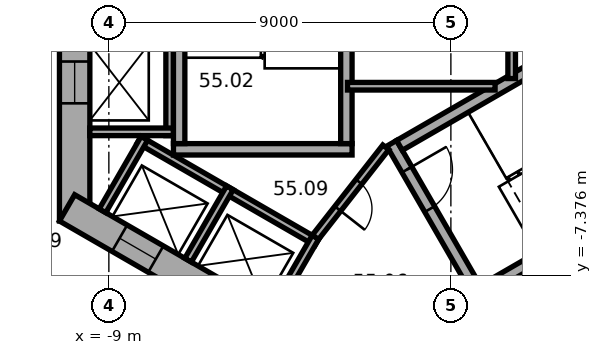
"""IFC4 building model, lengths in metres.
Left out: names, types, materials, properties, quantities, classifications, styles, units other than length and angle.
Written with IfcOpenShell. Run it as: python <this file> out.ifc"""

import sys

from ifc_helpers import new_model, si_unit, direction, frame, frame_2d, origin, place, context, subcontext, project, spatial, rectangle, extrude, element, fill, save


model = new_model("IFC4")
c1 = context("Model", 3, precision=1e-05, world=origin(), true_north=direction((0.0, 1.0)))
c2 = subcontext(c1, "Body", "Model", "MODEL_VIEW")
j1 = project(units=[si_unit("LENGTHUNIT", "METRE"), si_unit("PLANEANGLEUNIT", "RADIAN")], contexts=[c1])
p1 = place(None, origin())
s1 = spatial("IfcSite", under=j1, at=p1, CompositionType="ELEMENT")
p2 = place(p1, origin())
s2 = spatial("IfcBuilding", under=s1, at=p2, CompositionType="ELEMENT")
p3 = place(p2, frame((0.0, 0.0, 225.4)))
s3 = spatial("IfcBuildingStorey", under=s2, at=p3, CompositionType="ELEMENT", Elevation=225.4)
p4 = place(p3, frame((-9.9, 5.947, 0.0), z_axis=(0.0, 0.0, 1.0), x_axis=(0.0, -1.0, 0.0)))
e1 = element("IfcWall", 1, at=p4, inside=s3, PredefinedType="SHEAR", context=c2, shape_type="SweptSolid", body=[
    extrude(rectangle(XDim=11.894, YDim=0.8, at=frame_2d((5.947, 0.0))), origin(), (0.0, 0.0, 1.0), 3.7),
])
p5 = place(p4, frame((5.097, 0.0, 0.0)))
e2 = element("IfcOpeningElement", 2, at=p5, cuts=e1, PredefinedType="OPENING", context=c2, shape_type="SweptSolid", body=[
    extrude(rectangle(XDim=1.1, YDim=2.1, at=frame_2d((0.55, 1.05))), frame((0.0, 0.41, 0.0), z_axis=(0.0, -1.0, 0.0), x_axis=(1.0, 0.0, 0.0)), (0.0, 0.0, 1.0), 0.82),
])
p6 = place(p4, frame((7.697, 0.0, 0.0)))
e3 = element("IfcOpeningElement", 3, at=p6, cuts=e1, PredefinedType="OPENING", context=c2, shape_type="SweptSolid", body=[
    extrude(rectangle(XDim=1.1, YDim=2.1, at=frame_2d((0.55, 1.05))), frame((0.0, 0.41, 0.0), z_axis=(0.0, -1.0, 0.0), x_axis=(1.0, 0.0, 0.0)), (0.0, 0.0, 1.0), 0.82),
])
p7 = place(p3, frame((-10.1, -5.6, 0.0), z_axis=(0.0, 0.0, 1.0), x_axis=(0.866023897231, -0.500002609418, 0.0)))
e4 = element("IfcWall", 4, at=p7, inside=s3, PredefinedType="SHEAR", context=c2, shape_type="SweptSolid", body=[
    extrude(rectangle(XDim=11.894, YDim=0.8, at=frame_2d((5.947, 0.0))), origin(), (0.0, 0.0, 1.0), 3.7),
])
p8 = place(p7, frame((6.147, 0.0, 0.0)))
e5 = element("IfcOpeningElement", 5, at=p8, cuts=e4, PredefinedType="OPENING", context=c2, shape_type="SweptSolid", body=[
    extrude(rectangle(XDim=1.5, YDim=2.1, at=frame_2d((0.75, 1.05))), frame((0.0, 0.41, 0.0), z_axis=(0.0, -1.0, 0.0), x_axis=(1.0, 0.0, 0.0)), (0.0, 0.0, 1.0), 0.82),
])
p9 = place(p7, frame((1.597, 0.0, 0.0)))
e6 = element("IfcOpeningElement", 6, at=p9, cuts=e4, PredefinedType="OPENING", context=c2, shape_type="SweptSolid", body=[
    extrude(rectangle(XDim=1.1, YDim=2.1, at=frame_2d((0.55, 1.05))), frame((0.0, 0.41, 0.0), z_axis=(0.0, -1.0, 0.0), x_axis=(1.0, 0.0, 0.0)), (0.0, 0.0, 1.0), 0.82),
])
p10 = place(p7, frame((4.197, 0.0, 0.0)))
e7 = element("IfcOpeningElement", 7, at=p10, cuts=e4, PredefinedType="OPENING", context=c2, shape_type="SweptSolid", body=[
    extrude(rectangle(XDim=1.1, YDim=2.1, at=frame_2d((0.55, 1.05))), frame((0.0, 0.41, 0.0), z_axis=(0.0, -1.0, 0.0), x_axis=(1.0, 0.0, 0.0)), (0.0, 0.0, 1.0), 0.82),
])
p11 = place(p3, frame((-0.2, -11.547, 0.0), z_axis=(0.0, 0.0, 1.0), x_axis=(0.866023897231, 0.500002609418, 0.0)))
e8 = element("IfcWall", 8, at=p11, inside=s3, PredefinedType="SHEAR", context=c2, shape_type="SweptSolid", body=[
    extrude(rectangle(XDim=11.894, YDim=0.8, at=frame_2d((5.947, 0.0))), origin(), (0.0, 0.0, 1.0), 3.7),
])
p12 = place(p11, frame((2.497, 0.0, 0.0)))
e9 = element("IfcOpeningElement", 9, at=p12, cuts=e8, PredefinedType="OPENING", context=c2, shape_type="SweptSolid", body=[
    extrude(rectangle(XDim=1.1, YDim=2.1, at=frame_2d((0.55, 1.05))), frame((0.0, 0.41, 0.0), z_axis=(0.0, -1.0, 0.0), x_axis=(1.0, 0.0, 0.0)), (0.0, 0.0, 1.0), 0.82),
])
p13 = place(p11, frame((5.097, 0.0, 0.0)))
e10 = element("IfcOpeningElement", 10, at=p13, cuts=e8, PredefinedType="OPENING", context=c2, shape_type="SweptSolid", body=[
    extrude(rectangle(XDim=1.1, YDim=2.1, at=frame_2d((0.55, 1.05))), frame((0.0, 0.41, 0.0), z_axis=(0.0, -1.0, 0.0), x_axis=(1.0, 0.0, 0.0)), (0.0, 0.0, 1.0), 0.82),
])
p14 = place(p11, frame((7.697, 0.0, 0.0)))
e11 = element("IfcOpeningElement", 11, at=p14, cuts=e8, PredefinedType="OPENING", context=c2, shape_type="SweptSolid", body=[
    extrude(rectangle(XDim=1.1, YDim=2.1, at=frame_2d((0.55, 1.05))), frame((0.0, 0.41, 0.0), z_axis=(0.0, -1.0, 0.0), x_axis=(1.0, 0.0, 0.0)), (0.0, 0.0, 1.0), 0.82),
])
p15 = place(p3, frame((-7.4, 4.3, 0.0), z_axis=(0.0, 0.0, 1.0), x_axis=(0.0, -1.0, 0.0)))
e12 = element("IfcWall", 12, at=p15, inside=s3, PredefinedType="PARTITIONING", context=c2, shape_type="SweptSolid", body=[
    extrude(rectangle(XDim=8.0, YDim=0.2, at=frame_2d((4.0, 0.0))), origin(), (0.0, 0.0, 1.0), 3.42),
])
p16 = place(p3, frame((-7.3, -3.6, 0.0), z_axis=(0.0, 0.0, 1.0), x_axis=(-1.0, 0.0, 0.0)))
e13 = element("IfcWall", 13, at=p16, inside=s3, PredefinedType="PARTITIONING", context=c2, shape_type="SweptSolid", body=[
    extrude(rectangle(XDim=2.2, YDim=0.2, at=frame_2d((1.1, 0.0))), origin(), (0.0, 0.0, 1.0), 3.42),
])
p17 = place(p3, frame((-8.203, -3.809, 0.0), z_axis=(0.0, 0.0, 1.0), x_axis=(0.866028230842, -0.499995103361, 0.0)))
e14 = element("IfcWall", 14, at=p17, inside=s3, PredefinedType="PARTITIONING", context=c2, shape_type="SweptSolid", body=[
    extrude(rectangle(XDim=5.4, YDim=0.2, at=frame_2d((2.7, 0.0))), origin(), (0.0, 0.0, 1.0), 3.42),
])
for number, where, z_axis, x_axis in (
    (15, (-8.067, -3.772, 0.0), (0.0, 0.0, 1.0), (-0.5, -0.866, 0.0)),
    (16, (-5.815, -5.072, 0.0), (0.0, 0.0, 1.0), (-0.5, -0.866, 0.0)),
):
    element("IfcWall", number, at=place(p3, frame(where, z_axis=z_axis, x_axis=x_axis)), inside=s3, PredefinedType="PARTITIONING", context=c2, shape_type="SweptSolid", body=[
        extrude(rectangle(XDim=2.2, YDim=0.2, at=frame_2d((1.1, 0.0))), origin(), (0.0, 0.0, 1.0), 3.42),
    ])
p18 = place(p3, frame((-3.563, -6.372, 0.0), z_axis=(0.0, 0.0, 1.0), x_axis=(-0.499994660107, -0.866028486751, 0.0)))
e17 = element("IfcWall", 17, at=p18, inside=s3, PredefinedType="PARTITIONING", context=c2, shape_type="SweptSolid", body=[
    extrude(rectangle(XDim=2.2, YDim=0.2, at=frame_2d((1.1, 0.0))), origin(), (0.0, 0.0, 1.0), 3.42),
])
p19 = place(p3, frame((-0.024, -8.559, 0.0), z_axis=(0.0, 0.0, 1.0), x_axis=(0.866026010844, 0.49999894854, 0.0)))
e18 = element("IfcWall", 18, at=p19, inside=s3, PredefinedType="PARTITIONING", context=c2, shape_type="SweptSolid", body=[
    extrude(rectangle(XDim=8.0, YDim=0.2, at=frame_2d((4.0, 0.0))), origin(), (0.0, 0.0, 1.0), 3.42),
])
p20 = place(p3, frame((-2.6, -4.06, 0.0), z_axis=(0.0, 0.0, 1.0), x_axis=(-1.0, 0.0, 0.0)))
e19 = element("IfcWall", 19, at=p20, inside=s3, PredefinedType="SHEAR", context=c2, shape_type="SweptSolid", body=[
    extrude(rectangle(XDim=4.7, YDim=0.3, at=frame_2d((2.35, 0.0))), origin(), (0.0, 0.0, 1.0), 3.42),
])
for number, where, z_axis, x_axis in (
    (20, (-2.75, 3.15, 0.0), (0.0, 0.0, 1.0), (0.0, -1.0, 0.0)),
    (21, (-7.15, 3.15, 0.0), (0.0, 0.0, 1.0), (0.0, -1.0, 0.0)),
):
    element("IfcWall", number, at=place(p3, frame(where, z_axis=z_axis, x_axis=x_axis)), inside=s3, PredefinedType="SHEAR", context=c2, shape_type="SweptSolid", body=[
        extrude(rectangle(XDim=7.06, YDim=0.3, at=frame_2d((3.53, 0.0))), origin(), (0.0, 0.0, 1.0), 3.42),
    ])
p21 = place(p3, frame((-1.558, -3.902, 0.0), z_axis=(0.0, 0.0, 1.0), x_axis=(0.499977259774, -0.866038532462, 0.0)))
e22 = element("IfcWall", 22, at=p21, inside=s3, PredefinedType="SHEAR", context=c2, shape_type="SweptSolid", body=[
    extrude(rectangle(XDim=4.7, YDim=0.3, at=frame_2d((2.35, 0.0))), origin(), (0.0, 0.0, 1.0), 3.42),
])
p22 = place(p21, frame((0.8, 0.0, 0.0)))
e23 = element("IfcOpeningElement", 23, at=p22, cuts=e22, PredefinedType="OPENING", context=c2, shape_type="SweptSolid", body=[
    extrude(rectangle(XDim=1.2, YDim=2.1, at=frame_2d((0.6, 1.05))), frame((0.0, 0.16, 0.0), z_axis=(0.0, -1.0, 0.0), x_axis=(1.0, 0.0, 0.0)), (0.0, 0.0, 1.0), 0.32),
])
for number, where, z_axis, x_axis in (
    (24, (-1.353, -3.957, 0.0), (0.0, 0.0, 1.0), (0.866, 0.5, 0.0)),
    (25, (0.847, -7.767, 0.0), (0.0, 0.0, 1.0), (0.866, 0.5, 0.0)),
):
    element("IfcWall", number, at=place(p3, frame(where, z_axis=z_axis, x_axis=x_axis)), inside=s3, PredefinedType="SHEAR", context=c2, shape_type="SweptSolid", body=[
        extrude(rectangle(XDim=7.06, YDim=0.3, at=frame_2d((3.53, 0.0))), origin(), (0.0, 0.0, 1.0), 3.42),
    ])
p23 = place(p3, frame((-1.712, -4.008, 0.0), z_axis=(0.0, 0.0, 1.0), x_axis=(-0.616549420702, -0.787316208287, 0.0)))
e26 = element("IfcWall", 26, at=p23, inside=s3, PredefinedType="PARTITIONING", context=c2, shape_type="SweptSolid", body=[
    extrude(rectangle(XDim=3.002, YDim=0.2, at=frame_2d((1.501, 0.0))), origin(), (0.0, 0.0, 1.0), 3.42),
])
p24 = place(p23, frame((1.15, 0.0, 0.0)))
e27 = element("IfcOpeningElement", 27, at=p24, cuts=e26, PredefinedType="OPENING", context=c2, shape_type="SweptSolid", body=[
    extrude(rectangle(XDim=0.9, YDim=2.1, at=frame_2d((0.45, 1.05))), frame((0.0, 0.11, 0.0), z_axis=(0.0, -1.0, 0.0), x_axis=(1.0, 0.0, 0.0)), (0.0, 0.0, 1.0), 0.22),
])
p25 = place(p3, frame((-2.72, -2.4, 0.0), z_axis=(0.0, 0.0, 1.0), x_axis=(1.0, 0.0, 0.0)))
e28 = element("IfcWall", 28, at=p25, inside=s3, PredefinedType="PARTITIONING", context=c2, shape_type="SweptSolid", body=[
    extrude(rectangle(XDim=3.883, YDim=0.2, at=frame_2d((1.941, 0.0))), origin(), (0.0, 0.0, 1.0), 3.42),
])
p26 = place(p3, frame((1.6, -2.198, 0.0), z_axis=(0.0, 0.0, 1.0), x_axis=(0.0, 1.0, 0.0)))
e29 = element("IfcWall", 29, at=p26, inside=s3, PredefinedType="PARTITIONING", context=c2, shape_type="SweptSolid", body=[
    extrude(rectangle(XDim=4.397, YDim=0.2, at=frame_2d((2.198, 0.0))), origin(), (0.0, 0.0, 1.0), 3.42),
])
p27 = place(p22, origin())
e30 = element("IfcDoor", 30, at=p27, inside=s3, OperationType="SINGLE_SWING_RIGHT", PredefinedType="DOOR", context=c2, shape_type="SweptSolid", body=[
    extrude(rectangle(XDim=1.2, YDim=2.1, at=frame_2d((0.6, 1.05))), frame((0.0, 0.025, 0.0), z_axis=(0.0, -1.0, 0.0), x_axis=(1.0, 0.0, 0.0)), (0.0, 0.0, 1.0), 0.05),
])
fill(e23, e30)
p28 = place(p24, origin())
e31 = element("IfcDoor", 31, at=p28, inside=s3, OperationType="SINGLE_SWING_LEFT", PredefinedType="DOOR", context=c2, shape_type="SweptSolid", body=[
    extrude(rectangle(XDim=0.9, YDim=2.1, at=frame_2d((0.45, 1.05))), frame((0.0, 0.025, 0.0), z_axis=(0.0, -1.0, 0.0), x_axis=(1.0, 0.0, 0.0)), (0.0, 0.0, 1.0), 0.05),
])
fill(e27, e31)
p29 = place(p6, origin())
e32 = element("IfcDoor", 32, at=p29, inside=s3, OperationType="DOUBLE_DOOR_SLIDING", PredefinedType="DOOR", context=c2, shape_type="SweptSolid", body=[
    extrude(rectangle(XDim=1.1, YDim=2.1, at=frame_2d((0.55, 1.05))), frame((0.0, 0.025, 0.0), z_axis=(0.0, -1.0, 0.0), x_axis=(1.0, 0.0, 0.0)), (0.0, 0.0, 1.0), 0.05),
])
fill(e3, e32)
p30 = place(p9, origin())
e33 = element("IfcDoor", 33, at=p30, inside=s3, OperationType="DOUBLE_DOOR_SLIDING", PredefinedType="DOOR", context=c2, shape_type="SweptSolid", body=[
    extrude(rectangle(XDim=1.1, YDim=2.1, at=frame_2d((0.55, 1.05))), frame((0.0, 0.025, 0.0), z_axis=(0.0, -1.0, 0.0), x_axis=(1.0, 0.0, 0.0)), (0.0, 0.0, 1.0), 0.05),
])
fill(e6, e33)
save(model, sys.argv[1])
